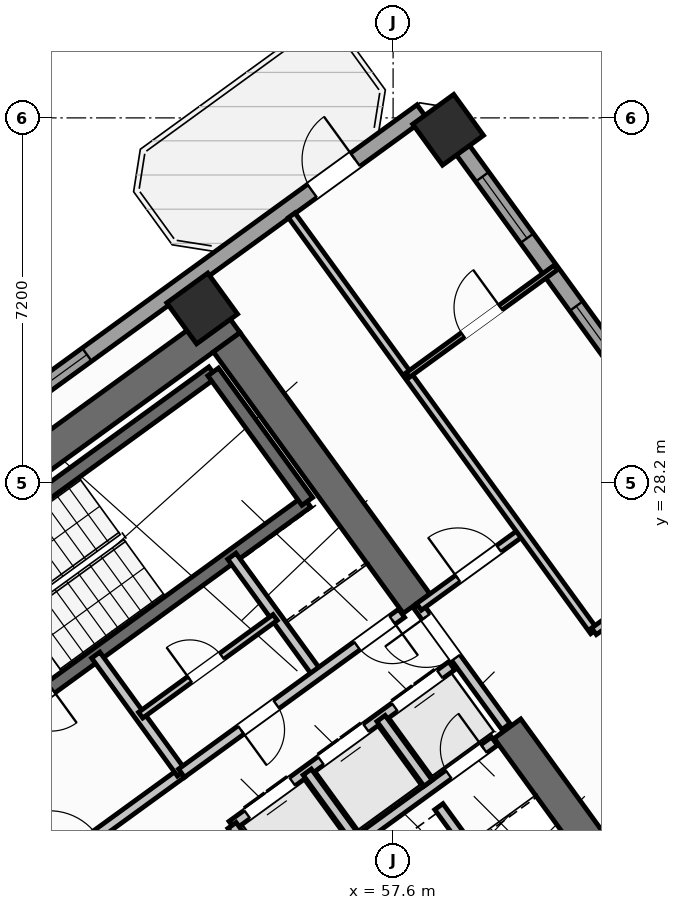
"""IFC4 building model, lengths in metres.
Left out: names, types, materials, properties, quantities, classifications, styles, units other than length and angle.
Written with IfcOpenShell. Run it as: python <this file> out.ifc"""

import sys

from ifc_helpers import new_model, si_unit, direction, frame, frame_2d, origin, origin_2d, place, context, subcontext, project, spatial, rectangle, hollow_rectangle, extrude, source, transform, mapped, element, fill, save


model = new_model("IFC4")
c1 = context("Model", 3, precision=1e-05, world=origin(), true_north=direction((0.0, 1.0)))
c2 = subcontext(c1, "Body", "Model", "MODEL_VIEW")
j1 = project(units=[si_unit("LENGTHUNIT", "METRE"), si_unit("PLANEANGLEUNIT", "RADIAN")], contexts=[c1])
p1 = place(None, origin())
s1 = spatial("IfcSite", under=j1, at=p1, CompositionType="ELEMENT")
p2 = place(p1, origin())
s2 = spatial("IfcBuilding", under=s1, at=p2, CompositionType="ELEMENT")
p3 = place(p2, frame((0.0, 0.0, 56.4)))
s3 = spatial("IfcBuildingStorey", under=s2, at=p3, CompositionType="ELEMENT", Elevation=56.4)
p4 = place(p3, frame((44.325, 24.113, 0.0), z_axis=(0.0, 0.0, 1.0), x_axis=(0.809012664862, 0.58779121131, 0.0)))
e1 = element("IfcWall", 1, at=p4, inside=s3, PredefinedType="SHEAR", context=c2, shape_type="SweptSolid", body=[
    extrude(rectangle(XDim=12.44, YDim=0.65, at=frame_2d((6.22, 0.0))), origin(), (0.0, 0.0, 1.0), 3.35),
])
p5 = place(p3, frame((61.929, 20.494, 0.0), z_axis=(0.0, 0.0, 1.0), x_axis=(-0.58782982593, 0.808984607855, 0.0)))
e2 = element("IfcWall", 2, at=p5, inside=s3, PredefinedType="SHEAR", context=c2, shape_type="SweptSolid", body=[
    extrude(rectangle(XDim=3.525, YDim=0.65, at=frame_2d((1.762, 0.0))), origin(), (0.0, 0.0, 1.0), 3.35),
])
p6 = place(p3, frame((58.064, 25.813, 0.0), z_axis=(0.0, 0.0, 1.0), x_axis=(-0.58777996584, 0.809020835181, 0.0)))
e3 = element("IfcWall", 3, at=p6, inside=s3, PredefinedType="SHEAR", context=c2, shape_type="SweptSolid", body=[
    extrude(rectangle(XDim=6.375, YDim=0.65, at=frame_2d((3.188, 0.0))), origin(), (0.0, 0.0, 1.0), 3.35),
])
m1 = source(origin(), c2, "Body", "SweptSolid", [
    extrude(hollow_rectangle(XDim=1.0, YDim=1.0, WallThickness=0.04, at=origin_2d()), origin(), (0.0, 0.0, 1.0), 3.6),
])
for number, where, z_axis, x_axis in (
    (4, (53.832, 31.638, 0.0), (0.0, 0.0, 1.0), (0.809, 0.588, 0.0)),
    (5, (58.686, 35.165, 0.0), (0.0, 0.0, 1.0), (0.809, 0.588, 0.0)),
):
    element("IfcColumn", number, at=place(p3, frame(where, z_axis=z_axis, x_axis=x_axis)), inside=s3, PredefinedType="COLUMN", context=c2, shape_type="MappedRepresentation", body=[
        mapped(m1, transform((0.0, 0.0, 0.0), scale=1.0)),
    ])
p7 = place(p3, frame((43.938, 25.192, 0.0), z_axis=(0.0, 0.0, 1.0), x_axis=(0.809016324578, 0.587786174187, 0.0)))
e6 = element("IfcWall", 6, at=p7, inside=s3, PredefinedType="STANDARD", context=c2, shape_type="SweptSolid", body=[
    extrude(rectangle(XDim=17.587, YDim=0.32, at=frame_2d((8.794, 0.0))), origin(), (0.0, 0.0, 1.0), 3.35),
])
p8 = place(p7, frame((14.914, 0.0, 0.0)))
e7 = element("IfcOpeningElement", 7, at=p8, cuts=e6, PredefinedType="OPENING", context=c2, shape_type="SweptSolid", body=[
    extrude(rectangle(XDim=1.05, YDim=2.15, at=frame_2d((0.525, 1.075))), frame((0.0, 0.17, 0.0), z_axis=(0.0, -1.0, 0.0), x_axis=(1.0, 0.0, 0.0)), (0.0, 0.0, 1.0), 0.34),
])
p9 = place(p7, frame((2.169, 0.0, 0.8)))
e8 = element("IfcOpeningElement", 8, at=p9, cuts=e6, PredefinedType="OPENING", context=c2, shape_type="SweptSolid", body=[
    extrude(rectangle(XDim=2.1, YDim=1.55, at=frame_2d((1.05, 0.775))), frame((0.0, 0.17, 0.0), z_axis=(0.0, -1.0, 0.0), x_axis=(1.0, 0.0, 0.0)), (0.0, 0.0, 1.0), 0.34),
])
p10 = place(p7, frame((7.319, 0.0, 0.8)))
e9 = element("IfcOpeningElement", 9, at=p10, cuts=e6, PredefinedType="OPENING", context=c2, shape_type="SweptSolid", body=[
    extrude(rectangle(XDim=2.1, YDim=1.55, at=frame_2d((1.05, 0.775))), frame((0.0, 0.17, 0.0), z_axis=(0.0, -1.0, 0.0), x_axis=(1.0, 0.0, 0.0)), (0.0, 0.0, 1.0), 0.34),
])
p11 = place(p3, frame((58.455, 35.484, 0.0), z_axis=(0.0, 0.0, 1.0), x_axis=(0.587783625747, -0.809018176127, 0.0)))
e10 = element("IfcWall", 10, at=p11, inside=s3, PredefinedType="STANDARD", context=c2, shape_type="SweptSolid", body=[
    extrude(rectangle(XDim=21.587, YDim=0.32, at=frame_2d((10.794, 0.0))), origin(), (0.0, 0.0, 1.0), 2.725),
])
p12 = place(p11, frame((1.54, 0.0, 0.85)))
e11 = element("IfcOpeningElement", 11, at=p12, cuts=e10, PredefinedType="OPENING", context=c2, shape_type="SweptSolid", body=[
    extrude(rectangle(XDim=1.5, YDim=1.5, at=frame_2d((0.75, 0.75))), frame((0.0, 0.17, 0.0), z_axis=(0.0, -1.0, 0.0), x_axis=(1.0, 0.0, 0.0)), (0.0, 0.0, 1.0), 0.34),
])
p13 = place(p11, frame((4.695, 0.0, 0.85)))
e12 = element("IfcOpeningElement", 12, at=p13, cuts=e10, PredefinedType="OPENING", context=c2, shape_type="SweptSolid", body=[
    extrude(rectangle(XDim=1.8, YDim=1.5, at=frame_2d((0.9, 0.75))), frame((0.0, 0.17, 0.0), z_axis=(0.0, -1.0, 0.0), x_axis=(1.0, 0.0, 0.0)), (0.0, 0.0, 1.0), 0.34),
])
p14 = place(p11, frame((13.009, 0.0, 1.0)))
e13 = element("IfcOpeningElement", 13, at=p14, cuts=e10, PredefinedType="OPENING", context=c2, shape_type="SweptSolid", body=[
    extrude(rectangle(XDim=0.9, YDim=1.25, at=frame_2d((0.45, 0.625))), frame((0.0, 0.17, 0.0), z_axis=(0.0, -1.0, 0.0), x_axis=(1.0, 0.0, 0.0)), (0.0, 0.0, 1.0), 0.34),
])
p15 = place(p11, frame((16.092, 0.0, 0.95)))
e14 = element("IfcOpeningElement", 14, at=p15, cuts=e10, PredefinedType="OPENING", context=c2, shape_type="SweptSolid", body=[
    extrude(rectangle(XDim=1.2, YDim=1.4, at=frame_2d((0.6, 0.7))), frame((0.0, 0.17, 0.0), z_axis=(0.0, -1.0, 0.0), x_axis=(1.0, 0.0, 0.0)), (0.0, 0.0, 1.0), 0.34),
])
p16 = place(p11, frame((19.085, 0.0, 1.0)))
e15 = element("IfcOpeningElement", 15, at=p16, cuts=e10, PredefinedType="OPENING", context=c2, shape_type="SweptSolid", body=[
    extrude(rectangle(XDim=0.9, YDim=1.25, at=frame_2d((0.45, 0.625))), frame((0.0, 0.17, 0.0), z_axis=(0.0, -1.0, 0.0), x_axis=(1.0, 0.0, 0.0)), (0.0, 0.0, 1.0), 0.34),
])
p17 = place(p3, frame((48.006, 25.996, 0.0), z_axis=(0.0, 0.0, 1.0), x_axis=(0.80901903764, 0.587782439969, 0.0)))
e16 = element("IfcWall", 16, at=p17, inside=s3, PredefinedType="SHEAR", context=c2, shape_type="SweptSolid", body=[
    extrude(rectangle(XDim=7.46, YDim=0.26, at=frame_2d((3.73, 0.0))), origin(), (0.0, 0.0, 1.0), 3.35),
])
p18 = place(p3, frame((49.863, 23.44, 0.0), z_axis=(0.0, 0.0, 1.0), x_axis=(0.809003474932, 0.587803859759, 0.0)))
e17 = element("IfcWall", 17, at=p18, inside=s3, PredefinedType="SHEAR", context=c2, shape_type="SweptSolid", body=[
    extrude(rectangle(XDim=7.46, YDim=0.26, at=frame_2d((3.73, 0.0))), origin(), (0.0, 0.0, 1.0), 3.35),
])
p19 = place(p18, frame((0.36, 0.0, 0.0)))
e18 = element("IfcOpeningElement", 18, at=p19, cuts=e17, PredefinedType="OPENING", context=c2, shape_type="SweptSolid", body=[
    extrude(rectangle(XDim=0.86, YDim=2.05, at=frame_2d((0.43, 1.025))), frame((0.0, 0.14, 0.0), z_axis=(0.0, -1.0, 0.0), x_axis=(1.0, 0.0, 0.0)), (0.0, 0.0, 1.0), 0.28),
])
p20 = place(p3, frame((55.906, 27.831, 0.0), z_axis=(0.0, 0.0, 1.0), x_axis=(-0.587804123638, 0.809003283204, 0.0)))
e19 = element("IfcWall", 19, at=p20, inside=s3, PredefinedType="SHEAR", context=c2, shape_type="SweptSolid", body=[
    extrude(rectangle(XDim=3.16, YDim=0.26, at=frame_2d((1.58, 0.0))), origin(), (0.0, 0.0, 1.0), 3.35),
])
p21 = place(p3, frame((48.799, 19.107, 0.0), z_axis=(0.0, 0.0, 1.0), x_axis=(0.809012959416, 0.587790805897, 0.0)))
e20 = element("IfcWall", 20, at=p21, inside=s3, PredefinedType="STANDARD", context=c2, shape_type="SweptSolid", body=[
    extrude(rectangle(XDim=5.718, YDim=0.2, at=frame_2d((2.859, 0.0))), origin(), (0.0, 0.0, 1.0), 3.34),
])
p22 = place(p21, frame((2.498, 0.0, 0.0)))
e21 = element("IfcOpeningElement", 21, at=p22, cuts=e20, PredefinedType="OPENING", context=c2, shape_type="SweptSolid", body=[
    extrude(rectangle(XDim=1.15, YDim=2.1, at=frame_2d((0.575, 1.05))), frame((0.0, 0.11, 0.0), z_axis=(0.0, -1.0, 0.0), x_axis=(1.0, 0.0, 0.0)), (0.0, 0.0, 1.0), 0.22),
])
p23 = place(p3, frame((56.553, 20.884, 0.0), z_axis=(0.0, 0.0, 1.0), x_axis=(0.809035789462, 0.587759382205, 0.0)))
e22 = element("IfcWall", 22, at=p23, inside=s3, PredefinedType="STANDARD", context=c2, shape_type="SweptSolid", body=[
    extrude(rectangle(XDim=3.768, YDim=0.2, at=frame_2d((1.884, 0.0))), origin(), (0.0, 0.0, 1.0), 3.34),
])
p24 = place(p23, frame((2.65, 0.0, 0.0)))
e23 = element("IfcOpeningElement", 23, at=p24, cuts=e22, PredefinedType="OPENING", context=c2, shape_type="SweptSolid", body=[
    extrude(rectangle(XDim=0.86, YDim=2.05, at=frame_2d((0.43, 1.025))), frame((0.0, 0.11, 0.0), z_axis=(0.0, -1.0, 0.0), x_axis=(1.0, 0.0, 0.0)), (0.0, 0.0, 1.0), 0.22),
])
p25 = place(p3, frame((54.421, 21.436, 0.0), z_axis=(0.0, 0.0, 1.0), x_axis=(0.809013710463, 0.587789772183, 0.0)))
e24 = element("IfcWall", 24, at=p25, inside=s3, PredefinedType="STANDARD", context=c2, shape_type="SweptSolid", body=[
    extrude(rectangle(XDim=5.36, YDim=0.2, at=frame_2d((2.68, 0.0))), origin(), (0.0, 0.0, 1.0), 3.34),
])
p26 = place(p25, frame((0.37, 0.0, 0.0)))
e25 = element("IfcOpeningElement", 25, at=p26, cuts=e24, PredefinedType="OPENING", context=c2, shape_type="SweptSolid", body=[
    extrude(rectangle(XDim=1.1, YDim=2.15, at=frame_2d((0.55, 1.075))), frame((0.0, 0.11, 0.0), z_axis=(0.0, -1.0, 0.0), x_axis=(1.0, 0.0, 0.0)), (0.0, 0.0, 1.0), 0.22),
])
p27 = place(p25, frame((2.17, 0.0, 0.0)))
e26 = element("IfcOpeningElement", 26, at=p27, cuts=e24, PredefinedType="OPENING", context=c2, shape_type="SweptSolid", body=[
    extrude(rectangle(XDim=1.1, YDim=2.15, at=frame_2d((0.55, 1.075))), frame((0.0, 0.11, 0.0), z_axis=(0.0, -1.0, 0.0), x_axis=(1.0, 0.0, 0.0)), (0.0, 0.0, 1.0), 0.22),
])
p28 = place(p25, frame((3.97, 0.0, 0.0)))
e27 = element("IfcOpeningElement", 27, at=p28, cuts=e24, PredefinedType="OPENING", context=c2, shape_type="SweptSolid", body=[
    extrude(rectangle(XDim=1.1, YDim=2.15, at=frame_2d((0.55, 1.075))), frame((0.0, 0.11, 0.0), z_axis=(0.0, -1.0, 0.0), x_axis=(1.0, 0.0, 0.0)), (0.0, 0.0, 1.0), 0.22),
])
p29 = place(p3, frame((55.391, 20.102, 0.0), z_axis=(0.0, 0.0, 1.0), x_axis=(-0.58778447739, 0.809017557374, 0.0)))
e28 = element("IfcWall", 28, at=p29, inside=s3, PredefinedType="STANDARD", context=c2, shape_type="SweptSolid", body=[
    extrude(rectangle(XDim=1.65, YDim=0.2, at=frame_2d((0.825, 0.0))), origin(), (0.0, 0.0, 1.0), 3.34),
])
p30 = place(p3, frame((56.834, 21.212, 0.0), z_axis=(0.0, 0.0, 1.0), x_axis=(-0.58776738483, 0.809029975545, 0.0)))
e29 = element("IfcWall", 29, at=p30, inside=s3, PredefinedType="STANDARD", context=c2, shape_type="SweptSolid", body=[
    extrude(rectangle(XDim=1.58, YDim=0.2, at=frame_2d((0.79, 0.0))), origin(), (0.0, 0.0, 1.0), 3.34),
])
p31 = place(p3, frame((58.29, 22.27, 0.0), z_axis=(0.0, 0.0, 1.0), x_axis=(-0.587840865826, 0.808976585857, 0.0)))
e30 = element("IfcWall", 30, at=p31, inside=s3, PredefinedType="STANDARD", context=c2, shape_type="SweptSolid", body=[
    extrude(rectangle(XDim=1.58, YDim=0.2, at=frame_2d((0.79, 0.0))), origin(), (0.0, 0.0, 1.0), 3.34),
])
p32 = place(p3, frame((60.067, 19.655, 0.0), z_axis=(0.0, 0.0, 1.0), x_axis=(-0.587800520745, 0.809005900975, 0.0)))
e31 = element("IfcWall", 31, at=p32, inside=s3, PredefinedType="STANDARD", context=c2, shape_type="SweptSolid", body=[
    extrude(rectangle(XDim=2.66, YDim=0.2, at=frame_2d((1.33, 0.0))), origin(), (0.0, 0.0, 1.0), 3.34),
])
p33 = place(p3, frame((53.425, 22.468, 0.0), z_axis=(0.0, 0.0, 1.0), x_axis=(-0.5877230039, 0.809062216821, 0.0)))
e32 = element("IfcWall", 32, at=p33, inside=s3, PredefinedType="STANDARD", context=c2, shape_type="SweptSolid", body=[
    extrude(rectangle(XDim=2.88, YDim=0.2, at=frame_2d((1.44, 0.0))), origin(), (0.0, 0.0, 1.0), 3.34),
])
p34 = place(p3, frame((56.111, 24.419, 0.0), z_axis=(0.0, 0.0, 1.0), x_axis=(-0.58777848983, 0.809021907548, 0.0)))
e33 = element("IfcWall", 33, at=p34, inside=s3, PredefinedType="STANDARD", context=c2, shape_type="SweptSolid", body=[
    extrude(rectangle(XDim=2.88, YDim=0.2, at=frame_2d((1.44, 0.0))), origin(), (0.0, 0.0, 1.0), 3.34),
])
p35 = place(p3, frame((53.425, 22.468, 0.0), z_axis=(0.0, 0.0, 1.0), x_axis=(0.80902705128, 0.587771409902, 0.0)))
e34 = element("IfcWall", 34, at=p35, inside=s3, PredefinedType="STANDARD", context=c2, shape_type="SweptSolid", body=[
    extrude(rectangle(XDim=5.368, YDim=0.2, at=frame_2d((2.684, 0.0))), origin(), (0.0, 0.0, 1.0), 3.34),
])
p36 = place(p35, frame((4.28, 0.0, 0.0)))
e35 = element("IfcOpeningElement", 35, at=p36, cuts=e34, PredefinedType="OPENING", context=c2, shape_type="SweptSolid", body=[
    extrude(rectangle(XDim=0.86, YDim=2.05, at=frame_2d((0.43, 1.025))), frame((0.0, 0.11, 0.0), z_axis=(0.0, -1.0, 0.0), x_axis=(1.0, 0.0, 0.0)), (0.0, 0.0, 1.0), 0.22),
])
p37 = place(p35, frame((1.45, 0.0, 0.0)))
e36 = element("IfcOpeningElement", 36, at=p37, cuts=e34, PredefinedType="OPENING", context=c2, shape_type="SweptSolid", body=[
    extrude(rectangle(XDim=0.86, YDim=2.05, at=frame_2d((0.43, 1.025))), frame((0.0, 0.11, 0.0), z_axis=(0.0, -1.0, 0.0), x_axis=(1.0, 0.0, 0.0)), (0.0, 0.0, 1.0), 0.22),
])
p38 = place(p3, frame((52.618, 23.612, 0.0), z_axis=(0.0, 0.0, 1.0), x_axis=(0.809009587469, 0.587795446889, 0.0)))
e37 = element("IfcWall", 37, at=p38, inside=s3, PredefinedType="PLUMBINGWALL", context=c2, shape_type="SweptSolid", body=[
    extrude(rectangle(XDim=3.28, YDim=0.14, at=frame_2d((1.64, 0.0))), origin(), (0.0, 0.0, 1.0), 3.34),
])
p39 = place(p38, frame((1.2, 0.0, 0.0)))
e38 = element("IfcOpeningElement", 38, at=p39, cuts=e37, PredefinedType="OPENING", context=c2, shape_type="SweptSolid", body=[
    extrude(rectangle(XDim=0.78, YDim=2.05, at=frame_2d((0.39, 1.025))), frame((0.0, 0.08, 0.0), z_axis=(0.0, -1.0, 0.0), x_axis=(1.0, 0.0, 0.0)), (0.0, 0.0, 1.0), 0.16),
])
p40 = place(p3, frame((59.827, 23.386, 0.0), z_axis=(0.0, 0.0, 1.0), x_axis=(-0.587803840107, 0.809003489211, 0.0)))
e39 = element("IfcWall", 39, at=p40, inside=s3, PredefinedType="STANDARD", context=c2, shape_type="SweptSolid", body=[
    extrude(rectangle(XDim=2.96, YDim=0.2, at=frame_2d((1.48, 0.0))), origin(), (0.0, 0.0, 1.0), 3.34),
])
p41 = place(p40, frame((1.68, 0.0, 0.0)))
e40 = element("IfcOpeningElement", 40, at=p41, cuts=e39, PredefinedType="OPENING", context=c2, shape_type="SweptSolid", body=[
    extrude(rectangle(XDim=1.0, YDim=2.1, at=frame_2d((0.5, 1.05))), frame((0.0, 0.11, 0.0), z_axis=(0.0, -1.0, 0.0), x_axis=(1.0, 0.0, 0.0)), (0.0, 0.0, 1.0), 0.22),
])
p42 = place(p3, frame((58.111, 25.749, 0.0), z_axis=(0.0, 0.0, 1.0), x_axis=(0.809000999347, 0.58780726693, 0.0)))
e41 = element("IfcWall", 41, at=p42, inside=s3, PredefinedType="PARTITIONING", context=c2, shape_type="SweptSolid", body=[
    extrude(rectangle(XDim=2.51, YDim=0.16, at=frame_2d((1.255, 0.0))), origin(), (0.0, 0.0, 1.0), 2.725),
])
p43 = place(p42, frame((0.95, 0.0, 0.0)))
e42 = element("IfcOpeningElement", 42, at=p43, cuts=e41, PredefinedType="OPENING", context=c2, shape_type="SweptSolid", body=[
    extrude(rectangle(XDim=1.0, YDim=2.1, at=frame_2d((0.5, 1.05))), frame((0.0, 0.09, 0.0), z_axis=(0.0, -1.0, 0.0), x_axis=(1.0, 0.0, 0.0)), (0.0, 0.0, 1.0), 0.18),
])
p44 = place(p3, frame((61.564, 25.266, 0.0), z_axis=(0.0, 0.0, 1.0), x_axis=(-0.587792629712, 0.809011634314, 0.0)))
e43 = element("IfcWall", 43, at=p44, inside=s3, PredefinedType="PARTITIONING", context=c2, shape_type="SweptSolid", body=[
    extrude(rectangle(XDim=10.15, YDim=0.16, at=frame_2d((5.075, 0.0))), origin(), (0.0, 0.0, 1.0), 3.34),
])
p45 = place(p3, frame((61.564, 25.266, 0.0), z_axis=(0.0, 0.0, 1.0), x_axis=(0.809012309495, 0.587791700422, 0.0)))
e44 = element("IfcWall", 44, at=p45, inside=s3, PredefinedType="PARTITIONING", context=c2, shape_type="SweptSolid", body=[
    extrude(rectangle(XDim=3.63, YDim=0.16, at=frame_2d((1.815, 0.0))), origin(), (0.0, 0.0, 1.0), 3.34),
])
p46 = place(p45, frame((1.305, 0.0, 0.0)))
e45 = element("IfcOpeningElement", 45, at=p46, cuts=e44, PredefinedType="OPENING", context=c2, shape_type="SweptSolid", body=[
    extrude(rectangle(XDim=1.0, YDim=2.1, at=frame_2d((0.5, 1.05))), frame((0.0, 0.09, 0.0), z_axis=(0.0, -1.0, 0.0), x_axis=(1.0, 0.0, 0.0)), (0.0, 0.0, 1.0), 0.18),
])
p47 = place(p3, frame((57.889, 30.324, 0.0), z_axis=(0.0, 0.0, 1.0), x_axis=(0.809005039917, 0.58780170584, 0.0)))
e46 = element("IfcWall", 46, at=p47, inside=s3, PredefinedType="PARTITIONING", context=c2, shape_type="SweptSolid", body=[
    extrude(rectangle(XDim=3.61, YDim=0.11, at=frame_2d((1.805, 0.0))), origin(), (0.0, 0.0, 1.0), 3.34),
])
p48 = place(p47, frame((1.345, 0.0, 0.0)))
e47 = element("IfcOpeningElement", 47, at=p48, cuts=e46, PredefinedType="OPENING", context=c2, shape_type="SweptSolid", body=[
    extrude(rectangle(XDim=0.92, YDim=2.08, at=frame_2d((0.46, 1.04))), frame((0.0, 0.065, 0.0), z_axis=(0.0, -1.0, 0.0), x_axis=(1.0, 0.0, 0.0)), (0.0, 0.0, 1.0), 0.13),
])
m2 = source(origin(), c2, "Body", "SweptSolid", [
    extrude(rectangle(XDim=1.05, YDim=2.15, at=frame_2d((0.525, 1.075))), frame((0.0, 0.025, 0.0), z_axis=(0.0, -1.0, 0.0), x_axis=(1.0, 0.0, 0.0)), (0.0, 0.0, 1.0), 0.05),
])
p49 = place(p8, origin())
e48 = element("IfcDoor", 48, at=p49, inside=s3, OperationType="SINGLE_SWING_RIGHT", PredefinedType="DOOR", context=c2, shape_type="MappedRepresentation", body=[
    mapped(m2, transform((0.0, 0.0, 0.0), scale=1.0)),
])
fill(e7, e48)
m3 = source(origin(), c2, "Body", "SweptSolid", [
    extrude(rectangle(XDim=2.1, YDim=1.55, at=frame_2d((1.05, 0.775))), frame((0.0, 0.03, 0.0), z_axis=(0.0, -1.0, 0.0), x_axis=(1.0, 0.0, 0.0)), (0.0, 0.0, 1.0), 0.06),
])
p50 = place(p10, origin())
e49 = element("IfcWindow", 49, at=p50, inside=s3, PartitioningType="SINGLE_PANEL", PredefinedType="WINDOW", context=c2, shape_type="MappedRepresentation", body=[
    mapped(m3, transform((0.0, 0.0, 0.0), scale=1.0)),
])
fill(e9, e49)
m4 = source(origin(), c2, "Body", "SweptSolid", [
    extrude(rectangle(XDim=1.5, YDim=1.5, at=frame_2d((0.75, 0.75))), frame((0.0, 0.03, 0.0), z_axis=(0.0, -1.0, 0.0), x_axis=(1.0, 0.0, 0.0)), (0.0, 0.0, 1.0), 0.06),
])
p51 = place(p12, origin())
e50 = element("IfcWindow", 50, at=p51, inside=s3, PartitioningType="SINGLE_PANEL", PredefinedType="WINDOW", context=c2, shape_type="MappedRepresentation", body=[
    mapped(m4, transform((0.0, 0.0, 0.0), scale=1.0)),
])
fill(e11, e50)
m5 = source(origin(), c2, "Body", "SweptSolid", [
    extrude(rectangle(XDim=1.8, YDim=1.5, at=frame_2d((0.9, 0.75))), frame((0.0, 0.03, 0.0), z_axis=(0.0, -1.0, 0.0), x_axis=(1.0, 0.0, 0.0)), (0.0, 0.0, 1.0), 0.06),
])
p52 = place(p13, origin())
e51 = element("IfcWindow", 51, at=p52, inside=s3, PartitioningType="SINGLE_PANEL", PredefinedType="WINDOW", context=c2, shape_type="MappedRepresentation", body=[
    mapped(m5, transform((0.0, 0.0, 0.0), scale=1.0)),
])
fill(e12, e51)
m6 = source(origin(), c2, "Body", "SweptSolid", [
    extrude(rectangle(XDim=1.1, YDim=2.15, at=frame_2d((0.55, 1.075))), frame((0.0, 0.025, 0.0), z_axis=(0.0, -1.0, 0.0), x_axis=(1.0, 0.0, 0.0)), (0.0, 0.0, 1.0), 0.05),
])
p53 = place(p26, origin())
e52 = element("IfcDoor", 52, at=p53, inside=s3, OperationType="DOUBLE_DOOR_SLIDING", PredefinedType="DOOR", context=c2, shape_type="MappedRepresentation", body=[
    mapped(m6, transform((0.0, 0.0, 0.0), scale=1.0)),
])
fill(e25, e52)
p54 = place(p27, origin())
e53 = element("IfcDoor", 53, at=p54, inside=s3, OperationType="DOUBLE_DOOR_SLIDING", PredefinedType="DOOR", context=c2, shape_type="MappedRepresentation", body=[
    mapped(m6, transform((0.0, 0.0, 0.0), scale=1.0)),
])
fill(e26, e53)
p55 = place(p28, origin())
e54 = element("IfcDoor", 54, at=p55, inside=s3, OperationType="DOUBLE_DOOR_SLIDING", PredefinedType="DOOR", context=c2, shape_type="MappedRepresentation", body=[
    mapped(m6, transform((0.0, 0.0, 0.0), scale=1.0)),
])
fill(e27, e54)
m7 = source(origin(), c2, "Body", "SweptSolid", [
    extrude(rectangle(XDim=0.86, YDim=2.05, at=frame_2d((0.43, 1.025))), frame((0.0, 0.025, 0.0), z_axis=(0.0, -1.0, 0.0), x_axis=(1.0, 0.0, 0.0)), (0.0, 0.0, 1.0), 0.05),
])
p56 = place(p24, origin())
e55 = element("IfcDoor", 55, at=p56, inside=s3, OperationType="SINGLE_SWING_RIGHT", PredefinedType="DOOR", context=c2, shape_type="MappedRepresentation", body=[
    mapped(m7, transform((0.0, 0.0, 0.0), scale=1.0)),
])
fill(e23, e55)
p57 = place(p36, frame((0.86, 0.0, 0.0), z_axis=(0.0, 0.0, 1.0), x_axis=(-1.0, 0.0, 0.0)))
e56 = element("IfcDoor", 56, at=p57, inside=s3, OperationType="SINGLE_SWING_LEFT", PredefinedType="DOOR", context=c2, shape_type="MappedRepresentation", body=[
    mapped(m7, transform((0.0, 0.0, 0.0), scale=1.0)),
])
fill(e35, e56)
p58 = place(p37, frame((0.86, 0.0, 0.0), z_axis=(0.0, 0.0, 1.0), x_axis=(-1.0, 0.0, 0.0)))
e57 = element("IfcDoor", 57, at=p58, inside=s3, OperationType="SINGLE_SWING_RIGHT", PredefinedType="DOOR", context=c2, shape_type="MappedRepresentation", body=[
    mapped(m7, transform((0.0, 0.0, 0.0), scale=1.0)),
])
fill(e36, e57)
m8 = source(origin(), c2, "Body", "SweptSolid", [
    extrude(rectangle(XDim=0.78, YDim=2.05, at=frame_2d((0.39, 1.025))), frame((0.0, 0.025, 0.0), z_axis=(0.0, -1.0, 0.0), x_axis=(1.0, 0.0, 0.0)), (0.0, 0.0, 1.0), 0.05),
])
p59 = place(p39, origin())
e58 = element("IfcDoor", 58, at=p59, inside=s3, OperationType="SINGLE_SWING_LEFT", PredefinedType="DOOR", context=c2, shape_type="MappedRepresentation", body=[
    mapped(m8, transform((0.0, 0.0, 0.0), scale=1.0)),
])
fill(e38, e58)
m9 = source(origin(), c2, "Body", "SweptSolid", [
    extrude(rectangle(XDim=1.0, YDim=2.1, at=frame_2d((0.5, 1.05))), frame((0.0, 0.025, 0.0), z_axis=(0.0, -1.0, 0.0), x_axis=(1.0, 0.0, 0.0)), (0.0, 0.0, 1.0), 0.05),
])
p60 = place(p43, origin())
e59 = element("IfcDoor", 59, at=p60, inside=s3, OperationType="SINGLE_SWING_LEFT", PredefinedType="DOOR", context=c2, shape_type="MappedRepresentation", body=[
    mapped(m9, transform((0.0, 0.0, 0.0), scale=1.0)),
])
fill(e42, e59)
p61 = place(p41, origin())
e60 = element("IfcDoor", 60, at=p61, inside=s3, OperationType="SINGLE_SWING_RIGHT", PredefinedType="DOOR", context=c2, shape_type="MappedRepresentation", body=[
    mapped(m9, transform((0.0, 0.0, 0.0), scale=1.0)),
])
fill(e40, e60)
m10 = source(origin(), c2, "Body", "SweptSolid", [
    extrude(rectangle(XDim=0.92, YDim=2.08, at=frame_2d((0.46, 1.04))), frame((0.0, 0.025, 0.0), z_axis=(0.0, -1.0, 0.0), x_axis=(1.0, 0.0, 0.0)), (0.0, 0.0, 1.0), 0.05),
])
p62 = place(p48, origin())
e61 = element("IfcDoor", 61, at=p62, inside=s3, OperationType="SINGLE_SWING_RIGHT", PredefinedType="DOOR", context=c2, shape_type="MappedRepresentation", body=[
    mapped(m10, transform((0.0, 0.0, 0.0), scale=1.0)),
])
fill(e47, e61)
save(model, sys.argv[1])
